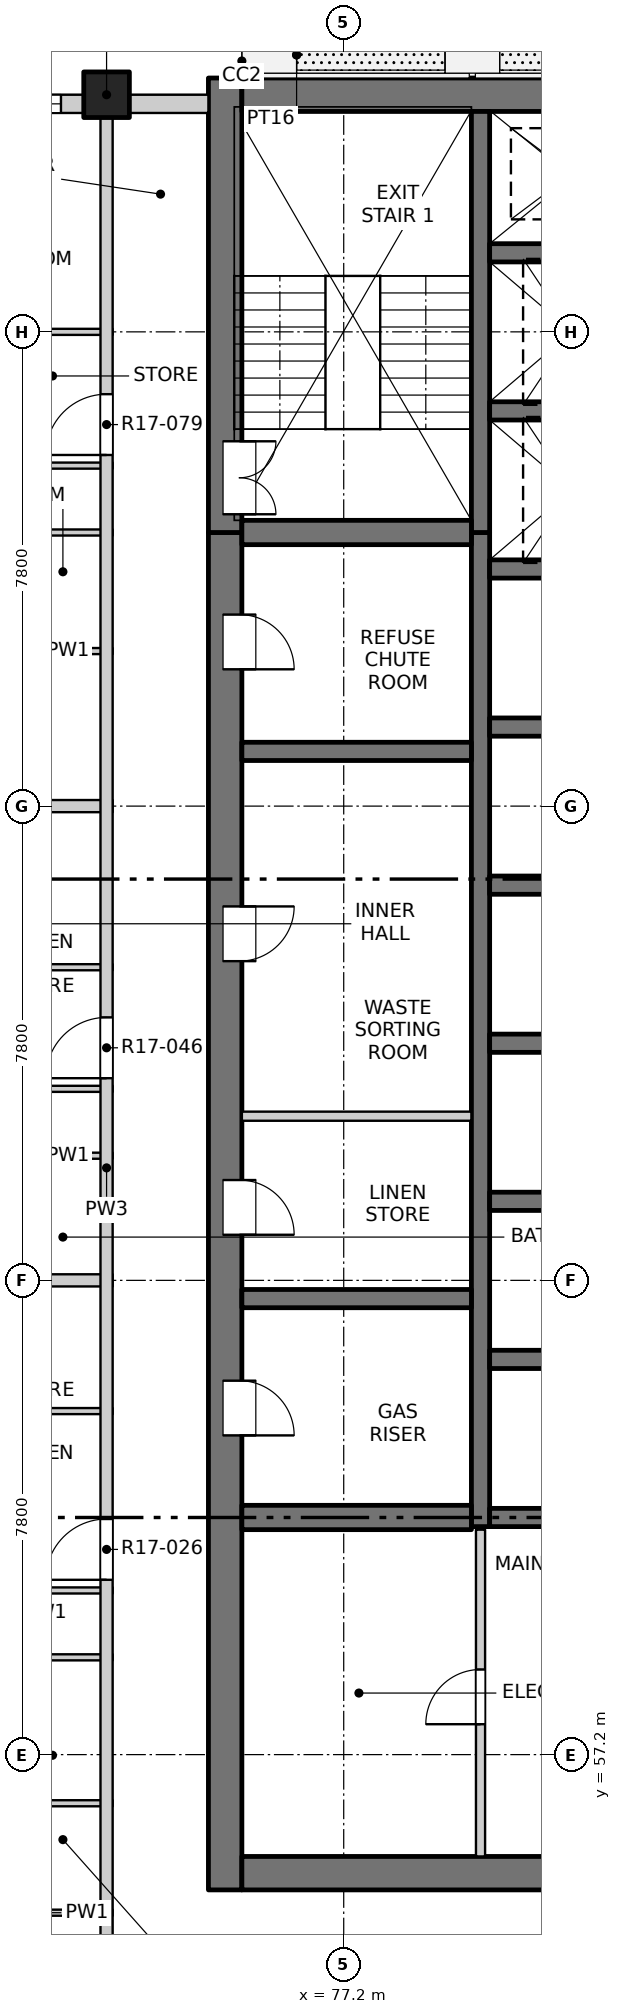
"""IFC4 building model, lengths in metres.
Left out: names, types, materials, properties, quantities, classifications, styles, units other than length and angle.
Written with IfcOpenShell. Run it as: python <this file> out.ifc"""

import sys

from ifc_helpers import new_model, si_unit, direction, frame, frame_2d, origin, origin_2d, place, context, subcontext, project, spatial, rectangle, extrude, element, fill, save


model = new_model("IFC4")
c1 = context("Model", 3, precision=1e-05, world=origin(), true_north=direction((0.0, 1.0)))
c2 = subcontext(c1, "Body", "Model", "MODEL_VIEW")
j1 = project(units=[si_unit("LENGTHUNIT", "METRE"), si_unit("PLANEANGLEUNIT", "RADIAN")], contexts=[c1])
p1 = place(None, origin())
s1 = spatial("IfcSite", under=j1, at=p1, CompositionType="ELEMENT")
p2 = place(p1, origin())
s2 = spatial("IfcBuilding", under=s1, at=p2, CompositionType="ELEMENT")
p3 = place(p2, frame((0.0, 0.0, 182.6)))
s3 = spatial("IfcBuildingStorey", under=s2, at=p3, CompositionType="ELEMENT", Elevation=182.6)
p4 = place(p3, frame((73.3, 84.5, -0.25), z_axis=(0.0, 0.0, 1.0), x_axis=(1.0, 0.0, 0.0)))
e1 = element("IfcColumn", 1, at=p4, inside=s3, PredefinedType="COLUMN", context=c2, shape_type="SweptSolid", body=[
    extrude(rectangle(XDim=0.75, YDim=0.75, at=origin_2d()), origin(), (0.0, 0.0, 1.0), 3.4),
])
p5 = place(p3, frame((75.25, 54.975, -0.25), z_axis=(0.0, 0.0, 1.0), x_axis=(0.0, 1.0, 0.0)))
e2 = element("IfcWall", 2, at=p5, inside=s3, PredefinedType="SOLIDWALL", context=c2, shape_type="SweptSolid", body=[
    extrude(rectangle(XDim=22.325, YDim=0.55, at=frame_2d((11.163, 0.0))), origin(), (0.0, 0.0, 1.0), 3.4),
])
p6 = place(p5, frame((7.475, 0.0, 0.25)))
e3 = element("IfcOpeningElement", 3, at=p6, cuts=e2, PredefinedType="OPENING", context=c2, shape_type="SweptSolid", body=[
    extrude(rectangle(XDim=0.9, YDim=2.1, at=frame_2d((0.45, 1.05))), frame((0.0, 0.285, 0.0), z_axis=(0.0, -1.0, 0.0), x_axis=(1.0, 0.0, 0.0)), (0.0, 0.0, 1.0), 0.57),
])
p7 = place(p5, frame((10.775, 0.0, 0.25)))
e4 = element("IfcOpeningElement", 4, at=p7, cuts=e2, PredefinedType="OPENING", context=c2, shape_type="SweptSolid", body=[
    extrude(rectangle(XDim=0.9, YDim=2.1, at=frame_2d((0.45, 1.05))), frame((0.0, 0.285, 0.0), z_axis=(0.0, -1.0, 0.0), x_axis=(1.0, 0.0, 0.0)), (0.0, 0.0, 1.0), 0.57),
])
p8 = place(p5, frame((15.275, 0.0, 0.25)))
e5 = element("IfcOpeningElement", 5, at=p8, cuts=e2, PredefinedType="OPENING", context=c2, shape_type="SweptSolid", body=[
    extrude(rectangle(XDim=0.9, YDim=2.1, at=frame_2d((0.45, 1.05))), frame((0.0, 0.285, 0.0), z_axis=(0.0, -1.0, 0.0), x_axis=(1.0, 0.0, 0.0)), (0.0, 0.0, 1.0), 0.57),
])
p9 = place(p5, frame((20.075, 0.0, 0.25)))
e6 = element("IfcOpeningElement", 6, at=p9, cuts=e2, PredefinedType="OPENING", context=c2, shape_type="SweptSolid", body=[
    extrude(rectangle(XDim=0.9, YDim=2.1, at=frame_2d((0.45, 1.05))), frame((0.0, 0.285, 0.0), z_axis=(0.0, -1.0, 0.0), x_axis=(1.0, 0.0, 0.0)), (0.0, 0.0, 1.0), 0.57),
])
p10 = place(p3, frame((75.25, 77.3, -0.25), z_axis=(0.0, 0.0, 1.0), x_axis=(0.0, 1.0, 0.0)))
e7 = element("IfcWall", 7, at=p10, inside=s3, PredefinedType="SOLIDWALL", context=c2, shape_type="SweptSolid", body=[
    extrude(rectangle(XDim=7.475, YDim=0.55, at=frame_2d((3.737, 0.0))), origin(), (0.0, 0.0, 1.0), 3.4),
])
p11 = place(p10, frame((0.3, 0.0, 0.25)))
e8 = element("IfcOpeningElement", 8, at=p11, cuts=e7, PredefinedType="OPENING", context=c2, shape_type="SweptSolid", body=[
    extrude(rectangle(XDim=1.2, YDim=2.1, at=frame_2d((0.6, 1.05))), frame((0.0, 0.285, 0.0), z_axis=(0.0, -1.0, 0.0), x_axis=(1.0, 0.0, 0.0)), (0.0, 0.0, 1.0), 0.57),
])
p12 = place(p3, frame((75.525, 55.25, -0.25), z_axis=(0.0, 0.0, 1.0), x_axis=(1.0, 0.0, 0.0)))
e9 = element("IfcWall", 9, at=p12, inside=s3, PredefinedType="SOLIDWALL", context=c2, shape_type="SweptSolid", body=[
    extrude(rectangle(XDim=18.95, YDim=0.55, at=frame_2d((9.475, 0.0))), origin(), (0.0, 0.0, 1.0), 3.4),
])
p13 = place(p12, frame((8.725, 0.0, 0.25)))
e10 = element("IfcOpeningElement", 10, at=p13, cuts=e9, PredefinedType="OPENING", context=c2, shape_type="SweptSolid", body=[
    extrude(rectangle(XDim=1.5, YDim=2.1, at=frame_2d((0.75, 1.05))), frame((0.0, 0.285, 0.0), z_axis=(0.0, -1.0, 0.0), x_axis=(1.0, 0.0, 0.0)), (0.0, 0.0, 1.0), 0.57),
])
p14 = place(p3, frame((75.525, 84.5, -0.25), z_axis=(0.0, 0.0, 1.0), x_axis=(1.0, 0.0, 0.0)))
e11 = element("IfcWall", 11, at=p14, inside=s3, PredefinedType="SOLIDWALL", context=c2, shape_type="SweptSolid", body=[
    extrude(rectangle(XDim=18.95, YDim=0.55, at=frame_2d((9.475, 0.0))), origin(), (0.0, 0.0, 1.0), 3.4),
])
p15 = place(p3, frame((79.45, 60.95, -0.25), z_axis=(0.0, 0.0, 1.0), x_axis=(0.0, 1.0, 0.0)))
e12 = element("IfcWall", 12, at=p15, inside=s3, PredefinedType="SOLIDWALL", context=c2, shape_type="SweptSolid", body=[
    extrude(rectangle(XDim=16.35, YDim=0.3, at=frame_2d((8.175, 0.0))), origin(), (0.0, 0.0, 1.0), 3.4),
])
p16 = place(p3, frame((79.45, 77.3, -0.25), z_axis=(0.0, 0.0, 1.0), x_axis=(0.0, 1.0, 0.0)))
e13 = element("IfcWall", 13, at=p16, inside=s3, PredefinedType="SOLIDWALL", context=c2, shape_type="SweptSolid", body=[
    extrude(rectangle(XDim=6.925, YDim=0.3, at=frame_2d((3.462, 0.0))), origin(), (0.0, 0.0, 1.0), 3.4),
])
for number, where, z_axis, x_axis in (
    (14, (79.6, 61.1, -0.25), (0.0, 0.0, 1.0), (1.0, 0.0, 0.0)),
    (15, (79.6, 63.7, -0.25), (0.0, 0.0, 1.0), (1.0, 0.0, 0.0)),
    (16, (79.6, 66.3, -0.25), (0.0, 0.0, 1.0), (1.0, 0.0, 0.0)),
    (17, (79.6, 68.9, -0.25), (0.0, 0.0, 1.0), (1.0, 0.0, 0.0)),
    (18, (79.6, 71.5, -0.25), (0.0, 0.0, 1.0), (1.0, 0.0, 0.0)),
    (19, (79.6, 74.1, -0.25), (0.0, 0.0, 1.0), (1.0, 0.0, 0.0)),
    (20, (79.6, 76.7, -0.25), (0.0, 0.0, 1.0), (1.0, 0.0, 0.0)),
    (21, (79.6, 79.3, -0.25), (0.0, 0.0, 1.0), (1.0, 0.0, 0.0)),
    (22, (79.6, 81.9, -0.25), (0.0, 0.0, 1.0), (1.0, 0.0, 0.0)),
):
    element("IfcWall", number, at=place(p3, frame(where, z_axis=z_axis, x_axis=x_axis)), inside=s3, PredefinedType="SOLIDWALL", context=c2, shape_type="SweptSolid", body=[
        extrude(rectangle(XDim=3.0, YDim=0.3, at=frame_2d((1.5, 0.0))), origin(), (0.0, 0.0, 1.0), 3.4),
    ])
p17 = place(p3, frame((75.525, 61.1, -0.25), z_axis=(0.0, 0.0, 1.0), x_axis=(1.0, 0.0, 0.0)))
e23 = element("IfcWall", 23, at=p17, inside=s3, PredefinedType="SOLIDWALL", context=c2, shape_type="SweptSolid", body=[
    extrude(rectangle(XDim=3.775, YDim=0.4, at=frame_2d((1.888, 0.0))), origin(), (0.0, 0.0, 1.0), 3.4),
])
for number, where, z_axis, x_axis in (
    (24, (75.525, 64.7, -0.25), (0.0, 0.0, 1.0), (1.0, 0.0, 0.0)),
    (25, (75.525, 73.7, -0.25), (0.0, 0.0, 1.0), (1.0, 0.0, 0.0)),
):
    element("IfcWall", number, at=place(p3, frame(where, z_axis=z_axis, x_axis=x_axis)), inside=s3, PredefinedType="SOLIDWALL", context=c2, shape_type="SweptSolid", body=[
        extrude(rectangle(XDim=3.775, YDim=0.3, at=frame_2d((1.888, 0.0))), origin(), (0.0, 0.0, 1.0), 3.4),
    ])
p18 = place(p3, frame((75.525, 77.3, -0.25), z_axis=(0.0, 0.0, 1.0), x_axis=(1.0, 0.0, 0.0)))
e26 = element("IfcWall", 26, at=p18, inside=s3, PredefinedType="SOLIDWALL", context=c2, shape_type="SweptSolid", body=[
    extrude(rectangle(XDim=3.775, YDim=0.4, at=frame_2d((1.888, 0.0))), origin(), (0.0, 0.0, 1.0), 3.4),
])
p19 = place(p3, frame((69.4, 84.35, 0.0), z_axis=(0.0, 0.0, 1.0), x_axis=(1.0, 0.0, 0.0)))
e27 = element("IfcWall", 27, at=p19, inside=s3, PredefinedType="SOLIDWALL", context=c2, shape_type="SweptSolid", body=[
    extrude(rectangle(XDim=3.525, YDim=0.3, at=frame_2d((1.763, 0.0))), origin(), (0.0, 0.0, 1.0), 2.7),
])
p20 = place(p19, frame((0.75, 0.0, 0.9)))
e28 = element("IfcOpeningElement", 28, at=p20, cuts=e27, PredefinedType="OPENING", context=c2, shape_type="SweptSolid", body=[
    extrude(rectangle(XDim=2.4, YDim=1.8, at=frame_2d((1.2, 0.9))), frame((0.0, 0.16, 0.0), z_axis=(0.0, -1.0, 0.0), x_axis=(1.0, 0.0, 0.0)), (0.0, 0.0, 1.0), 0.32),
])
p21 = place(p3, frame((73.675, 84.35, 0.0), z_axis=(0.0, 0.0, 1.0), x_axis=(1.0, 0.0, 0.0)))
e29 = element("IfcWall", 29, at=p21, inside=s3, PredefinedType="SOLIDWALL", context=c2, shape_type="SweptSolid", body=[
    extrude(rectangle(XDim=1.3, YDim=0.3, at=frame_2d((0.65, 0.0))), origin(), (0.0, 0.0, 1.0), 2.7),
])
for number, where, z_axis, x_axis in (
    (30, (71.18, 54.6, 0.0), (0.0, 0.0, 1.0), (1.0, 0.0, 0.0)),
    (31, (71.18, 56.4, 0.0), (0.0, 0.0, 1.0), (1.0, 0.0, 0.0)),
    (32, (71.18, 58.8, 0.0), (0.0, 0.0, 1.0), (1.0, 0.0, 0.0)),
    (33, (71.18, 59.9, 0.0), (0.0, 0.0, 1.0), (1.0, 0.0, 0.0)),
    (34, (71.18, 62.85, 0.0), (0.0, 0.0, 1.0), (1.0, 0.0, 0.0)),
):
    element("IfcWall", number, at=place(p3, frame(where, z_axis=z_axis, x_axis=x_axis)), inside=s3, PredefinedType="PARTITIONING", context=c2, shape_type="SweptSolid", body=[
        extrude(rectangle(XDim=2.22, YDim=0.1, at=frame_2d((1.11, 0.0))), origin(), (0.0, 0.0, 1.0), 3.15),
    ])
p22 = place(p3, frame((65.8, 65.0, 0.0), z_axis=(0.0, 0.0, 1.0), x_axis=(1.0, 0.0, 0.0)))
e35 = element("IfcWall", 35, at=p22, inside=s3, PredefinedType="PARTITIONING", context=c2, shape_type="SweptSolid", body=[
    extrude(rectangle(XDim=7.6, YDim=0.2, at=frame_2d((3.8, 0.0))), origin(), (0.0, 0.0, 1.0), 3.15),
])
p23 = place(p3, frame((71.18, 67.05, 0.0), z_axis=(0.0, 0.0, 1.0), x_axis=(1.0, 0.0, 0.0)))
e36 = element("IfcWall", 36, at=p23, inside=s3, PredefinedType="PARTITIONING", context=c2, shape_type="SweptSolid", body=[
    extrude(rectangle(XDim=2.22, YDim=0.1, at=frame_2d((1.11, 0.0))), origin(), (0.0, 0.0, 1.0), 3.15),
])
p24 = place(p3, frame((75.525, 67.7, 0.0), z_axis=(0.0, 0.0, 1.0), x_axis=(1.0, 0.0, 0.0)))
e37 = element("IfcWall", 37, at=p24, inside=s3, PredefinedType="PARTITIONING", context=c2, shape_type="SweptSolid", body=[
    extrude(rectangle(XDim=3.775, YDim=0.15, at=frame_2d((1.887, 0.0))), origin(), (0.0, 0.0, 1.0), 3.15),
])
for number, where, z_axis, x_axis in (
    (38, (71.18, 68.15, 0.0), (0.0, 0.0, 1.0), (1.0, 0.0, 0.0)),
    (39, (71.18, 70.15, 0.0), (0.0, 0.0, 1.0), (1.0, 0.0, 0.0)),
):
    element("IfcWall", number, at=place(p3, frame(where, z_axis=z_axis, x_axis=x_axis)), inside=s3, PredefinedType="PARTITIONING", context=c2, shape_type="SweptSolid", body=[
        extrude(rectangle(XDim=2.22, YDim=0.1, at=frame_2d((1.11, 0.0))), origin(), (0.0, 0.0, 1.0), 3.15),
    ])
p25 = place(p3, frame((65.8, 72.8, 0.0), z_axis=(0.0, 0.0, 1.0), x_axis=(1.0, 0.0, 0.0)))
e40 = element("IfcWall", 40, at=p25, inside=s3, PredefinedType="PARTITIONING", context=c2, shape_type="SweptSolid", body=[
    extrude(rectangle(XDim=7.6, YDim=0.2, at=frame_2d((3.8, 0.0))), origin(), (0.0, 0.0, 1.0), 3.15),
])
for number, where, z_axis, x_axis in (
    (41, (71.18, 75.35, 0.0), (0.0, 0.0, 1.0), (1.0, 0.0, 0.0)),
    (42, (71.18, 77.3, 0.0), (0.0, 0.0, 1.0), (1.0, 0.0, 0.0)),
    (43, (71.18, 78.4, 0.0), (0.0, 0.0, 1.0), (1.0, 0.0, 0.0)),
):
    element("IfcWall", number, at=place(p3, frame(where, z_axis=z_axis, x_axis=x_axis)), inside=s3, PredefinedType="PARTITIONING", context=c2, shape_type="SweptSolid", body=[
        extrude(rectangle(XDim=2.22, YDim=0.1, at=frame_2d((1.11, 0.0))), origin(), (0.0, 0.0, 1.0), 3.15),
    ])
p26 = place(p3, frame((65.8, 80.6, 0.0), z_axis=(0.0, 0.0, 1.0), x_axis=(1.0, 0.0, 0.0)))
e44 = element("IfcWall", 44, at=p26, inside=s3, PredefinedType="PARTITIONING", context=c2, shape_type="SweptSolid", body=[
    extrude(rectangle(XDim=7.6, YDim=0.1, at=frame_2d((3.8, 0.0))), origin(), (0.0, 0.0, 1.0), 3.15),
])
p27 = place(p26, frame((4.14, 0.0, 0.0)))
e45 = element("IfcOpeningElement", 45, at=p27, cuts=e44, PredefinedType="OPENING", context=c2, shape_type="SweptSolid", body=[
    extrude(rectangle(XDim=0.9, YDim=2.1, at=frame_2d((0.45, 1.05))), frame((0.0, 0.06, 0.0), z_axis=(0.0, -1.0, 0.0), x_axis=(1.0, 0.0, 0.0)), (0.0, 0.0, 1.0), 0.12),
])
p28 = place(p3, frame((73.3, 49.5, 0.0), z_axis=(0.0, 0.0, 1.0), x_axis=(0.0, 1.0, 0.0)))
e46 = element("IfcWall", 46, at=p28, inside=s3, PredefinedType="PARTITIONING", context=c2, shape_type="SweptSolid", body=[
    extrude(rectangle(XDim=34.7, YDim=0.2, at=frame_2d((17.35, 0.0))), origin(), (0.0, 0.0, 1.0), 3.15),
])
p29 = place(p28, frame((10.575, 0.0, 0.0)))
e47 = element("IfcOpeningElement", 47, at=p29, cuts=e46, PredefinedType="OPENING", context=c2, shape_type="SweptSolid", body=[
    extrude(rectangle(XDim=1.0, YDim=2.1, at=frame_2d((0.5, 1.05))), frame((0.0, 0.11, 0.0), z_axis=(0.0, -1.0, 0.0), x_axis=(1.0, 0.0, 0.0)), (0.0, 0.0, 1.0), 0.22),
])
p30 = place(p28, frame((18.825, 0.0, 0.0)))
e48 = element("IfcOpeningElement", 48, at=p30, cuts=e46, PredefinedType="OPENING", context=c2, shape_type="SweptSolid", body=[
    extrude(rectangle(XDim=1.0, YDim=2.1, at=frame_2d((0.5, 1.05))), frame((0.0, 0.11, 0.0), z_axis=(0.0, -1.0, 0.0), x_axis=(1.0, 0.0, 0.0)), (0.0, 0.0, 1.0), 0.22),
])
p31 = place(p28, frame((29.075, 0.0, 0.0)))
e49 = element("IfcOpeningElement", 49, at=p31, cuts=e46, PredefinedType="OPENING", context=c2, shape_type="SweptSolid", body=[
    extrude(rectangle(XDim=1.0, YDim=2.1, at=frame_2d((0.5, 1.05))), frame((0.0, 0.11, 0.0), z_axis=(0.0, -1.0, 0.0), x_axis=(1.0, 0.0, 0.0)), (0.0, 0.0, 1.0), 0.22),
])
p32 = place(p3, frame((79.45, 55.525, 0.0), z_axis=(0.0, 0.0, 1.0), x_axis=(0.0, 1.0, 0.0)))
e50 = element("IfcWall", 50, at=p32, inside=s3, PredefinedType="PARTITIONING", context=c2, shape_type="SweptSolid", body=[
    extrude(rectangle(XDim=5.375, YDim=0.15, at=frame_2d((2.688, 0.0))), origin(), (0.0, 0.0, 1.0), 3.15),
])
p33 = place(p32, frame((2.175, 0.0, 0.0)))
e51 = element("IfcOpeningElement", 51, at=p33, cuts=e50, PredefinedType="OPENING", context=c2, shape_type="SweptSolid", body=[
    extrude(rectangle(XDim=0.9, YDim=2.1, at=frame_2d((0.45, 1.05))), frame((0.0, 0.085, 0.0), z_axis=(0.0, -1.0, 0.0), x_axis=(1.0, 0.0, 0.0)), (0.0, 0.0, 1.0), 0.17),
])
p34 = place(p20, origin())
e52 = element("IfcWindow", 52, at=p34, inside=s3, PartitioningType="DOUBLE_PANEL_VERTICAL", PredefinedType="WINDOW", context=c2, shape_type="SweptSolid", body=[
    extrude(rectangle(XDim=2.4, YDim=1.8, at=frame_2d((1.2, 0.9))), frame((0.0, 0.03, 0.0), z_axis=(0.0, -1.0, 0.0), x_axis=(1.0, 0.0, 0.0)), (0.0, 0.0, 1.0), 0.06),
])
fill(e28, e52)
p35 = place(p33, origin())
e53 = element("IfcDoor", 53, at=p35, inside=s3, OperationType="SINGLE_SWING_LEFT", PredefinedType="DOOR", context=c2, shape_type="SweptSolid", body=[
    extrude(rectangle(XDim=0.9, YDim=2.1, at=frame_2d((0.45, 1.05))), frame((0.0, 0.025, 0.0), z_axis=(0.0, -1.0, 0.0), x_axis=(1.0, 0.0, 0.0)), (0.0, 0.0, 1.0), 0.05),
])
fill(e51, e53)
p36 = place(p29, origin())
e54 = element("IfcDoor", 54, at=p36, inside=s3, OperationType="SINGLE_SWING_RIGHT", PredefinedType="DOOR", context=c2, shape_type="SweptSolid", body=[
    extrude(rectangle(XDim=1.0, YDim=2.1, at=frame_2d((0.5, 1.05))), frame((0.0, 0.025, 0.0), z_axis=(0.0, -1.0, 0.0), x_axis=(1.0, 0.0, 0.0)), (0.0, 0.0, 1.0), 0.05),
])
fill(e47, e54)
p37 = place(p6, origin())
e55 = element("IfcDoor", 55, at=p37, inside=s3, OperationType="SINGLE_SWING_RIGHT", PredefinedType="DOOR", context=c2, shape_type="SweptSolid", body=[
    extrude(rectangle(XDim=0.9, YDim=2.1, at=frame_2d((0.45, 1.05))), frame((0.0, -0.21, 0.0), z_axis=(0.0, -1.0, 0.0), x_axis=(1.0, 0.0, 0.0)), (0.0, 0.0, 1.0), 0.05),
])
fill(e3, e55)
p38 = place(p7, origin())
e56 = element("IfcDoor", 56, at=p38, inside=s3, OperationType="SINGLE_SWING_RIGHT", PredefinedType="DOOR", context=c2, shape_type="SweptSolid", body=[
    extrude(rectangle(XDim=0.9, YDim=2.1, at=frame_2d((0.45, 1.05))), frame((0.0, -0.21, 0.0), z_axis=(0.0, -1.0, 0.0), x_axis=(1.0, 0.0, 0.0)), (0.0, 0.0, 1.0), 0.05),
])
fill(e4, e56)
p39 = place(p30, origin())
e57 = element("IfcDoor", 57, at=p39, inside=s3, OperationType="SINGLE_SWING_RIGHT", PredefinedType="DOOR", context=c2, shape_type="SweptSolid", body=[
    extrude(rectangle(XDim=1.0, YDim=2.1, at=frame_2d((0.5, 1.05))), frame((0.0, 0.025, 0.0), z_axis=(0.0, -1.0, 0.0), x_axis=(1.0, 0.0, 0.0)), (0.0, 0.0, 1.0), 0.05),
])
fill(e48, e57)
p40 = place(p8, origin())
e58 = element("IfcDoor", 58, at=p40, inside=s3, OperationType="SINGLE_SWING_LEFT", PredefinedType="DOOR", context=c2, shape_type="SweptSolid", body=[
    extrude(rectangle(XDim=0.9, YDim=2.1, at=frame_2d((0.45, 1.05))), frame((0.0, -0.21, 0.0), z_axis=(0.0, -1.0, 0.0), x_axis=(1.0, 0.0, 0.0)), (0.0, 0.0, 1.0), 0.05),
])
fill(e5, e58)
p41 = place(p9, origin())
e59 = element("IfcDoor", 59, at=p41, inside=s3, OperationType="SINGLE_SWING_RIGHT", PredefinedType="DOOR", context=c2, shape_type="SweptSolid", body=[
    extrude(rectangle(XDim=0.9, YDim=2.1, at=frame_2d((0.45, 1.05))), frame((0.0, -0.21, 0.0), z_axis=(0.0, -1.0, 0.0), x_axis=(1.0, 0.0, 0.0)), (0.0, 0.0, 1.0), 0.05),
])
fill(e6, e59)
p42 = place(p11, origin())
e60 = element("IfcDoor", 60, at=p42, inside=s3, OperationType="DOUBLE_DOOR_SINGLE_SWING", PredefinedType="DOOR", context=c2, shape_type="SweptSolid", body=[
    extrude(rectangle(XDim=1.2, YDim=2.1, at=frame_2d((0.6, 1.05))), frame((0.0, -0.21, 0.0), z_axis=(0.0, -1.0, 0.0), x_axis=(1.0, 0.0, 0.0)), (0.0, 0.0, 1.0), 0.05),
])
fill(e8, e60)
p43 = place(p31, origin())
e61 = element("IfcDoor", 61, at=p43, inside=s3, OperationType="SINGLE_SWING_RIGHT", PredefinedType="DOOR", context=c2, shape_type="SweptSolid", body=[
    extrude(rectangle(XDim=1.0, YDim=2.1, at=frame_2d((0.5, 1.05))), frame((0.0, 0.025, 0.0), z_axis=(0.0, -1.0, 0.0), x_axis=(1.0, 0.0, 0.0)), (0.0, 0.0, 1.0), 0.05),
])
fill(e49, e61)
save(model, sys.argv[1])
